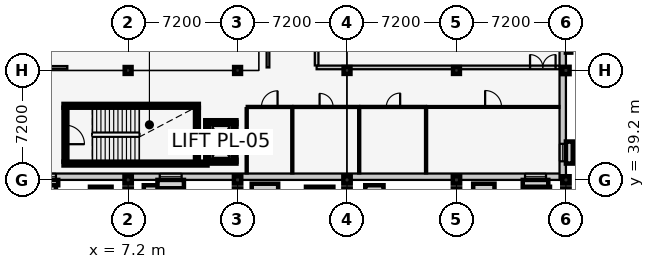
"""IFC4 building model, lengths in metres.
Left out: names, types, materials, properties, quantities, classifications, styles, units other than length and angle.
Written with IfcOpenShell. Run it as: python <this file> out.ifc"""

import sys

from ifc_helpers import new_model, si_unit, direction, frame, frame_2d, origin, origin_2d, place, context, subcontext, project, spatial, rectangle, extrude, element, fill, save


model = new_model("IFC4")
c1 = context("Model", 3, precision=1e-05, world=origin(), true_north=direction((0.0, 1.0)))
c2 = subcontext(c1, "Body", "Model", "MODEL_VIEW")
j1 = project(units=[si_unit("LENGTHUNIT", "METRE"), si_unit("PLANEANGLEUNIT", "RADIAN")], contexts=[c1])
p1 = place(None, origin())
s1 = spatial("IfcSite", under=j1, at=p1, CompositionType="ELEMENT")
p2 = place(p1, origin())
s2 = spatial("IfcBuilding", under=s1, at=p2, CompositionType="ELEMENT")
p3 = place(p2, frame((0.0, 0.0, 9.6)))
s3 = spatial("IfcBuildingStorey", under=s2, at=p3, CompositionType="ELEMENT", Elevation=9.6)
for number, where, z_axis, x_axis in (
    (1, (7.2, 38.4, 0.0), (0.0, 0.0, 1.0), (1.0, 0.0, 0.0)),
    (2, (14.4, 38.4, 0.0), (0.0, 0.0, 1.0), (1.0, 0.0, 0.0)),
    (3, (21.6, 38.4, 0.0), (0.0, 0.0, 1.0), (1.0, 0.0, 0.0)),
    (4, (28.8, 38.4, 0.0), (0.0, 0.0, 1.0), (1.0, 0.0, 0.0)),
    (5, (36.0, 38.4, 0.0), (0.0, 0.0, 1.0), (1.0, 0.0, 0.0)),
    (6, (7.2, 39.2, 0.0), (0.0, 0.0, 1.0), (1.0, 0.0, 0.0)),
):
    element("IfcColumn", number, at=place(p3, frame(where, z_axis=z_axis, x_axis=x_axis)), inside=s3, PredefinedType="COLUMN", context=c2, shape_type="SweptSolid", body=[
        extrude(rectangle(XDim=0.48, YDim=0.48, at=origin_2d()), origin(), (0.0, 0.0, 1.0), 4.2),
    ])
p4 = place(p3, frame((7.2, 46.4, 0.0), z_axis=(0.0, 0.0, 1.0), x_axis=(1.0, 0.0, 0.0)))
e7 = element("IfcColumn", 7, at=p4, inside=s3, PredefinedType="COLUMN", context=c2, shape_type="SweptSolid", body=[
    extrude(rectangle(XDim=0.45, YDim=0.45, at=origin_2d()), origin(), (0.0, 0.0, 1.0), 4.2),
])
p5 = place(p3, frame((14.4, 39.2, 0.0), z_axis=(0.0, 0.0, 1.0), x_axis=(1.0, 0.0, 0.0)))
e8 = element("IfcColumn", 8, at=p5, inside=s3, PredefinedType="COLUMN", context=c2, shape_type="SweptSolid", body=[
    extrude(rectangle(XDim=0.48, YDim=0.48, at=origin_2d()), origin(), (0.0, 0.0, 1.0), 4.2),
])
p6 = place(p3, frame((14.4, 46.4, 0.0), z_axis=(0.0, 0.0, 1.0), x_axis=(1.0, 0.0, 0.0)))
e9 = element("IfcColumn", 9, at=p6, inside=s3, PredefinedType="COLUMN", context=c2, shape_type="SweptSolid", body=[
    extrude(rectangle(XDim=0.45, YDim=0.45, at=origin_2d()), origin(), (0.0, 0.0, 1.0), 4.2),
])
p7 = place(p3, frame((21.6, 39.2, 0.0), z_axis=(0.0, 0.0, 1.0), x_axis=(1.0, 0.0, 0.0)))
e10 = element("IfcColumn", 10, at=p7, inside=s3, PredefinedType="COLUMN", context=c2, shape_type="SweptSolid", body=[
    extrude(rectangle(XDim=0.48, YDim=0.48, at=origin_2d()), origin(), (0.0, 0.0, 1.0), 4.2),
])
p8 = place(p3, frame((21.6, 46.4, 0.0), z_axis=(0.0, 0.0, 1.0), x_axis=(1.0, 0.0, 0.0)))
e11 = element("IfcColumn", 11, at=p8, inside=s3, PredefinedType="COLUMN", context=c2, shape_type="SweptSolid", body=[
    extrude(rectangle(XDim=0.45, YDim=0.45, at=origin_2d()), origin(), (0.0, 0.0, 1.0), 4.2),
])
p9 = place(p3, frame((28.8, 39.2, 0.0), z_axis=(0.0, 0.0, 1.0), x_axis=(1.0, 0.0, 0.0)))
e12 = element("IfcColumn", 12, at=p9, inside=s3, PredefinedType="COLUMN", context=c2, shape_type="SweptSolid", body=[
    extrude(rectangle(XDim=0.48, YDim=0.48, at=origin_2d()), origin(), (0.0, 0.0, 1.0), 4.2),
])
p10 = place(p3, frame((28.8, 46.4, 0.0), z_axis=(0.0, 0.0, 1.0), x_axis=(1.0, 0.0, 0.0)))
e13 = element("IfcColumn", 13, at=p10, inside=s3, PredefinedType="COLUMN", context=c2, shape_type="SweptSolid", body=[
    extrude(rectangle(XDim=0.45, YDim=0.45, at=origin_2d()), origin(), (0.0, 0.0, 1.0), 4.2),
])
for number, where, z_axis, x_axis in (
    (14, (36.0, 39.2, 0.0), (0.0, 0.0, 1.0), (1.0, 0.0, 0.0)),
    (15, (36.0, 46.4, 0.0), (0.0, 0.0, 1.0), (1.0, 0.0, 0.0)),
):
    element("IfcColumn", number, at=place(p3, frame(where, z_axis=z_axis, x_axis=x_axis)), inside=s3, PredefinedType="COLUMN", context=c2, shape_type="SweptSolid", body=[
        extrude(rectangle(XDim=0.48, YDim=0.48, at=origin_2d()), origin(), (0.0, 0.0, 1.0), 4.2),
    ])
p11 = place(p3, frame((36.0, 39.41, 0.0), z_axis=(0.0, 0.0, 1.0), x_axis=(-1.0, 0.0, 0.0)))
e16 = element("IfcWall", 16, at=p11, inside=s3, PredefinedType="SOLIDWALL", context=c2, shape_type="SweptSolid", body=[
    extrude(rectangle(XDim=36.0, YDim=0.42, at=frame_2d((18.0, 0.0))), origin(), (0.0, 0.0, 1.0), 3.245),
])
p12 = place(p11, frame((1.31, 0.0, 0.9)))
e17 = element("IfcOpeningElement", 17, at=p12, cuts=e16, PredefinedType="OPENING", context=c2, shape_type="SweptSolid", body=[
    extrude(rectangle(XDim=1.38, YDim=1.6, at=frame_2d((0.69, 0.8))), frame((0.0, 0.222, 0.0), z_axis=(0.0, -1.0, 0.0), x_axis=(1.0, 0.0, 0.0)), (0.0, 0.0, 1.0), 0.444),
])
p13 = place(p11, frame((25.28, 0.0, 0.9)))
e18 = element("IfcOpeningElement", 18, at=p13, cuts=e16, PredefinedType="OPENING", context=c2, shape_type="SweptSolid", body=[
    extrude(rectangle(XDim=1.44, YDim=1.75, at=frame_2d((0.72, 0.875))), frame((0.0, 0.222, 0.0), z_axis=(0.0, -1.0, 0.0), x_axis=(1.0, 0.0, 0.0)), (0.0, 0.0, 1.0), 0.444),
])
p14 = place(p11, frame((33.55, 0.0, 0.9)))
e19 = element("IfcOpeningElement", 19, at=p14, cuts=e16, PredefinedType="OPENING", context=c2, shape_type="SweptSolid", body=[
    extrude(rectangle(XDim=0.9, YDim=1.35, at=frame_2d((0.45, 0.675))), frame((0.0, 0.222, 0.0), z_axis=(0.0, -1.0, 0.0), x_axis=(1.0, 0.0, 0.0)), (0.0, 0.0, 1.0), 0.444),
])
p15 = place(p3, frame((35.79, 68.0, 0.0), z_axis=(0.0, 0.0, 1.0), x_axis=(0.0, -1.0, 0.0)))
e20 = element("IfcWall", 20, at=p15, inside=s3, PredefinedType="SOLIDWALL", context=c2, shape_type="SweptSolid", body=[
    extrude(rectangle(XDim=28.8, YDim=0.42, at=frame_2d((14.4, 0.0))), origin(), (0.0, 0.0, 1.0), 3.345),
])
p16 = place(p15, frame((1.3, 0.0, 0.9)))
e21 = element("IfcOpeningElement", 21, at=p16, cuts=e20, PredefinedType="OPENING", context=c2, shape_type="SweptSolid", body=[
    extrude(rectangle(XDim=1.0, YDim=1.35, at=frame_2d((0.5, 0.675))), frame((0.0, 0.222, 0.0), z_axis=(0.0, -1.0, 0.0), x_axis=(1.0, 0.0, 0.0)), (0.0, 0.0, 1.0), 0.444),
])
p17 = place(p15, frame((4.85, 0.0, 0.9)))
e22 = element("IfcOpeningElement", 22, at=p17, cuts=e20, PredefinedType="OPENING", context=c2, shape_type="SweptSolid", body=[
    extrude(rectangle(XDim=1.1, YDim=1.35, at=frame_2d((0.55, 0.675))), frame((0.0, 0.222, 0.0), z_axis=(0.0, -1.0, 0.0), x_axis=(1.0, 0.0, 0.0)), (0.0, 0.0, 1.0), 0.444),
])
p18 = place(p15, frame((8.4, 0.0, 0.9)))
e23 = element("IfcOpeningElement", 23, at=p18, cuts=e20, PredefinedType="OPENING", context=c2, shape_type="SweptSolid", body=[
    extrude(rectangle(XDim=1.2, YDim=1.35, at=frame_2d((0.6, 0.675))), frame((0.0, 0.222, 0.0), z_axis=(0.0, -1.0, 0.0), x_axis=(1.0, 0.0, 0.0)), (0.0, 0.0, 1.0), 0.444),
])
p19 = place(p15, frame((11.95, 0.0, 0.9)))
e24 = element("IfcOpeningElement", 24, at=p19, cuts=e20, PredefinedType="OPENING", context=c2, shape_type="SweptSolid", body=[
    extrude(rectangle(XDim=1.3, YDim=1.35, at=frame_2d((0.65, 0.675))), frame((0.0, 0.222, 0.0), z_axis=(0.0, -1.0, 0.0), x_axis=(1.0, 0.0, 0.0)), (0.0, 0.0, 1.0), 0.444),
])
p20 = place(p15, frame((15.5, 0.0, 0.9)))
e25 = element("IfcOpeningElement", 25, at=p20, cuts=e20, PredefinedType="OPENING", context=c2, shape_type="SweptSolid", body=[
    extrude(rectangle(XDim=1.4, YDim=1.35, at=frame_2d((0.7, 0.675))), frame((0.0, 0.222, 0.0), z_axis=(0.0, -1.0, 0.0), x_axis=(1.0, 0.0, 0.0)), (0.0, 0.0, 1.0), 0.444),
])
p21 = place(p15, frame((19.325, 0.0, 0.9)))
e26 = element("IfcOpeningElement", 26, at=p21, cuts=e20, PredefinedType="OPENING", context=c2, shape_type="SweptSolid", body=[
    extrude(rectangle(XDim=0.95, YDim=1.45, at=frame_2d((0.475, 0.725))), frame((0.0, 0.222, 0.0), z_axis=(0.0, -1.0, 0.0), x_axis=(1.0, 0.0, 0.0)), (0.0, 0.0, 1.0), 0.444),
])
p22 = place(p15, frame((26.425, 0.0, 0.9)))
e27 = element("IfcOpeningElement", 27, at=p22, cuts=e20, PredefinedType="OPENING", context=c2, shape_type="SweptSolid", body=[
    extrude(rectangle(XDim=1.15, YDim=1.45, at=frame_2d((0.575, 0.725))), frame((0.0, 0.222, 0.0), z_axis=(0.0, -1.0, 0.0), x_axis=(1.0, 0.0, 0.0)), (0.0, 0.0, 1.0), 0.444),
])
p23 = place(p3, frame((2.95, 40.275, 0.0), z_axis=(0.0, 0.0, 1.0), x_axis=(1.0, 0.0, 0.0)))
e28 = element("IfcWall", 28, at=p23, inside=s3, PredefinedType="SHEAR", context=c2, shape_type="SweptSolid", body=[
    extrude(rectangle(XDim=9.47, YDim=0.25, at=frame_2d((4.735, 0.0))), origin(), (0.0, 0.0, 1.0), 3.95),
])
p24 = place(p3, frame((11.85, 44.075, 0.0), z_axis=(0.0, 0.0, 1.0), x_axis=(-1.0, 0.0, 0.0)))
e29 = element("IfcWall", 29, at=p24, inside=s3, PredefinedType="SHEAR", context=c2, shape_type="SweptSolid", body=[
    extrude(rectangle(XDim=8.9, YDim=0.25, at=frame_2d((4.45, 0.0))), origin(), (0.0, 0.0, 1.0), 3.95),
])
p25 = place(p3, frame((3.075, 43.95, 0.0), z_axis=(0.0, 0.0, 1.0), x_axis=(0.0, -1.0, 0.0)))
e30 = element("IfcWall", 30, at=p25, inside=s3, PredefinedType="SHEAR", context=c2, shape_type="SweptSolid", body=[
    extrude(rectangle(XDim=3.55, YDim=0.25, at=frame_2d((1.775, 0.0))), origin(), (0.0, 0.0, 1.0), 3.95),
])
p26 = place(p25, frame((1.15, 0.0, 0.0)))
e31 = element("IfcOpeningElement", 31, at=p26, cuts=e30, PredefinedType="OPENING", context=c2, shape_type="SweptSolid", body=[
    extrude(rectangle(XDim=1.25, YDim=2.15, at=frame_2d((0.625, 1.075))), frame((0.0, 0.137, 0.0), z_axis=(0.0, -1.0, 0.0), x_axis=(1.0, 0.0, 0.0)), (0.0, 0.0, 1.0), 0.274),
])
p27 = place(p3, frame((11.725, 40.4, 0.0), z_axis=(0.0, 0.0, 1.0), x_axis=(0.0, 1.0, 0.0)))
e32 = element("IfcWall", 32, at=p27, inside=s3, PredefinedType="SHEAR", context=c2, shape_type="SweptSolid", body=[
    extrude(rectangle(XDim=3.55, YDim=0.25, at=frame_2d((1.775, 0.0))), origin(), (0.0, 0.0, 1.0), 3.95),
])
p28 = place(p3, frame((12.275, 40.4, 0.0), z_axis=(0.0, 0.0, 1.0), x_axis=(1.0, 0.0, 0.0)))
e33 = element("IfcWall", 33, at=p28, inside=s3, PredefinedType="SHEAR", context=c2, shape_type="SweptSolid", body=[
    extrude(rectangle(XDim=2.05, YDim=0.25, at=frame_2d((1.025, 0.0))), origin(), (0.0, 0.0, 1.0), 3.95),
])
p29 = place(p3, frame((14.325, 43.0, 0.0), z_axis=(0.0, 0.0, 1.0), x_axis=(-1.0, 0.0, 0.0)))
e34 = element("IfcWall", 34, at=p29, inside=s3, PredefinedType="SHEAR", context=c2, shape_type="SweptSolid", body=[
    extrude(rectangle(XDim=2.05, YDim=0.25, at=frame_2d((1.025, 0.0))), origin(), (0.0, 0.0, 1.0), 3.95),
])
p30 = place(p29, frame((0.55, 0.0, 0.0)))
e35 = element("IfcOpeningElement", 35, at=p30, cuts=e34, PredefinedType="OPENING", context=c2, shape_type="SweptSolid", body=[
    extrude(rectangle(XDim=0.95, YDim=2.1, at=frame_2d((0.475, 1.05))), frame((0.0, 0.137, 0.0), z_axis=(0.0, -1.0, 0.0), x_axis=(1.0, 0.0, 0.0)), (0.0, 0.0, 1.0), 0.274),
])
for number, where, z_axis, x_axis in (
    (36, (12.4, 43.0, 0.0), (0.0, 0.0, 1.0), (0.0, -1.0, 0.0)),
    (37, (14.2, 40.4, 0.0), (0.0, 0.0, 1.0), (0.0, 1.0, 0.0)),
):
    element("IfcWall", number, at=place(p3, frame(where, z_axis=z_axis, x_axis=x_axis)), inside=s3, PredefinedType="SHEAR", context=c2, shape_type="SweptSolid", body=[
        extrude(rectangle(XDim=2.6, YDim=0.25, at=frame_2d((1.3, 0.0))), origin(), (0.0, 0.0, 1.0), 3.95),
    ])
p31 = place(p3, frame((0.43, 46.6, 0.0), z_axis=(0.0, 0.0, 1.0), x_axis=(1.0, 0.0, 0.0)))
e38 = element("IfcWall", 38, at=p31, inside=s3, PredefinedType="PARTITIONING", context=c2, shape_type="SweptSolid", body=[
    extrude(rectangle(XDim=2.77, YDim=0.18, at=frame_2d((1.385, 0.0))), origin(), (0.0, 0.0, 1.0), 3.225),
])
p32 = place(p3, frame((16.4, 46.6, 0.0), z_axis=(0.0, 0.0, 1.0), x_axis=(0.0, 1.0, 0.0)))
e39 = element("IfcWall", 39, at=p32, inside=s3, PredefinedType="PARTITIONING", context=c2, shape_type="SweptSolid", body=[
    extrude(rectangle(XDim=20.97, YDim=0.18, at=frame_2d((10.485, 0.0))), origin(), (0.0, 0.0, 1.0), 3.95),
])
p33 = place(p32, frame((6.42, 0.0, 0.0)))
e40 = element("IfcOpeningElement", 40, at=p33, cuts=e39, PredefinedType="OPENING", context=c2, shape_type="SweptSolid", body=[
    extrude(rectangle(XDim=1.76, YDim=2.3, at=frame_2d((0.88, 1.15))), frame((0.0, 0.102, 0.0), z_axis=(0.0, -1.0, 0.0), x_axis=(1.0, 0.0, 0.0)), (0.0, 0.0, 1.0), 0.204),
])
p34 = place(p32, frame((17.325, 0.0, 0.0)))
e41 = element("IfcOpeningElement", 41, at=p34, cuts=e39, PredefinedType="OPENING", context=c2, shape_type="SweptSolid", body=[
    extrude(rectangle(XDim=0.92, YDim=2.08, at=frame_2d((0.46, 1.04))), frame((0.0, 0.102, 0.0), z_axis=(0.0, -1.0, 0.0), x_axis=(1.0, 0.0, 0.0)), (0.0, 0.0, 1.0), 0.204),
])
p35 = place(p3, frame((19.6, 46.6, 0.0), z_axis=(0.0, 0.0, 1.0), x_axis=(1.0, 0.0, 0.0)))
e42 = element("IfcWall", 42, at=p35, inside=s3, PredefinedType="PARTITIONING", context=c2, shape_type="SweptSolid", body=[
    extrude(rectangle(XDim=15.97, YDim=0.24, at=frame_2d((7.985, 0.0))), origin(), (0.0, 0.0, 1.0), 3.125),
])
p36 = place(p35, frame((14.04, 0.0, 0.0)))
e43 = element("IfcOpeningElement", 43, at=p36, cuts=e42, PredefinedType="OPENING", context=c2, shape_type="SweptSolid", body=[
    extrude(rectangle(XDim=1.68, YDim=2.3, at=frame_2d((0.84, 1.15))), frame((0.0, 0.132, 0.0), z_axis=(0.0, -1.0, 0.0), x_axis=(1.0, 0.0, 0.0)), (0.0, 0.0, 1.0), 0.264),
])
p37 = place(p3, frame((19.6, 46.73, 0.0), z_axis=(0.0, 0.0, 1.0), x_axis=(0.0, 1.0, 0.0)))
e44 = element("IfcWall", 44, at=p37, inside=s3, PredefinedType="PARTITIONING", context=c2, shape_type="SweptSolid", body=[
    extrude(rectangle(XDim=14.34, YDim=0.24, at=frame_2d((7.17, 0.0))), origin(), (0.0, 0.0, 1.0), 3.95),
])
p38 = place(p3, frame((15.0, 44.0, 0.0), z_axis=(0.0, 0.0, 1.0), x_axis=(1.0, 0.0, 0.0)))
e45 = element("IfcWall", 45, at=p38, inside=s3, PredefinedType="PARTITIONING", context=c2, shape_type="SweptSolid", body=[
    extrude(rectangle(XDim=3.0, YDim=0.14, at=frame_2d((1.5, 0.0))), origin(), (0.0, 0.0, 1.0), 3.95),
])
p39 = place(p38, frame((0.97, 0.0, 0.0)))
e46 = element("IfcOpeningElement", 46, at=p39, cuts=e45, PredefinedType="OPENING", context=c2, shape_type="SweptSolid", body=[
    extrude(rectangle(XDim=1.06, YDim=2.1, at=frame_2d((0.53, 1.05))), frame((0.0, 0.082, 0.0), z_axis=(0.0, -1.0, 0.0), x_axis=(1.0, 0.0, 0.0)), (0.0, 0.0, 1.0), 0.164),
])
p40 = place(p3, frame((15.0, 39.63, 0.0), z_axis=(0.0, 0.0, 1.0), x_axis=(0.0, 1.0, 0.0)))
e47 = element("IfcWall", 47, at=p40, inside=s3, PredefinedType="PARTITIONING", context=c2, shape_type="SweptSolid", body=[
    extrude(rectangle(XDim=4.29, YDim=0.14, at=frame_2d((2.145, 0.0))), origin(), (0.0, 0.0, 1.0), 3.95),
])
p41 = place(p3, frame((18.0, 39.63, 0.0), z_axis=(0.0, 0.0, 1.0), x_axis=(0.0, 1.0, 0.0)))
e48 = element("IfcWall", 48, at=p41, inside=s3, PredefinedType="PARTITIONING", context=c2, shape_type="SweptSolid", body=[
    extrude(rectangle(XDim=4.29, YDim=0.14, at=frame_2d((2.145, 0.0))), origin(), (0.0, 0.0, 1.0), 3.535),
])
p42 = place(p3, frame((18.08, 44.0, 0.0), z_axis=(0.0, 0.0, 1.0), x_axis=(1.0, 0.0, 0.0)))
e49 = element("IfcWall", 49, at=p42, inside=s3, PredefinedType="PARTITIONING", context=c2, shape_type="SweptSolid", body=[
    extrude(rectangle(XDim=4.32, YDim=0.14, at=frame_2d((2.16, 0.0))), origin(), (0.0, 0.0, 1.0), 3.95),
])
p43 = place(p42, frame((1.715, 0.0, 0.0)))
e50 = element("IfcOpeningElement", 50, at=p43, cuts=e49, PredefinedType="OPENING", context=c2, shape_type="SweptSolid", body=[
    extrude(rectangle(XDim=0.89, YDim=2.05, at=frame_2d((0.445, 1.025))), frame((0.0, 0.082, 0.0), z_axis=(0.0, -1.0, 0.0), x_axis=(1.0, 0.0, 0.0)), (0.0, 0.0, 1.0), 0.164),
])
p44 = place(p3, frame((22.4, 39.63, 0.0), z_axis=(0.0, 0.0, 1.0), x_axis=(0.0, 1.0, 0.0)))
e51 = element("IfcWall", 51, at=p44, inside=s3, PredefinedType="PARTITIONING", context=c2, shape_type="SweptSolid", body=[
    extrude(rectangle(XDim=4.29, YDim=0.14, at=frame_2d((2.145, 0.0))), origin(), (0.0, 0.0, 1.0), 3.95),
])
p45 = place(p3, frame((22.48, 44.0, 0.0), z_axis=(0.0, 0.0, 1.0), x_axis=(1.0, 0.0, 0.0)))
e52 = element("IfcWall", 52, at=p45, inside=s3, PredefinedType="PARTITIONING", context=c2, shape_type="SweptSolid", body=[
    extrude(rectangle(XDim=4.32, YDim=0.14, at=frame_2d((2.16, 0.0))), origin(), (0.0, 0.0, 1.0), 3.95),
])
p46 = place(p45, frame((1.705, 0.0, 0.0)))
e53 = element("IfcOpeningElement", 53, at=p46, cuts=e52, PredefinedType="OPENING", context=c2, shape_type="SweptSolid", body=[
    extrude(rectangle(XDim=0.91, YDim=2.06, at=frame_2d((0.455, 1.03))), frame((0.0, 0.082, 0.0), z_axis=(0.0, -1.0, 0.0), x_axis=(1.0, 0.0, 0.0)), (0.0, 0.0, 1.0), 0.164),
])
p47 = place(p3, frame((26.8, 39.63, 0.0), z_axis=(0.0, 0.0, 1.0), x_axis=(0.0, 1.0, 0.0)))
e54 = element("IfcWall", 54, at=p47, inside=s3, PredefinedType="PARTITIONING", context=c2, shape_type="SweptSolid", body=[
    extrude(rectangle(XDim=4.29, YDim=0.14, at=frame_2d((2.145, 0.0))), origin(), (0.0, 0.0, 1.0), 3.95),
])
p48 = place(p3, frame((26.88, 44.0, 0.0), z_axis=(0.0, 0.0, 1.0), x_axis=(1.0, 0.0, 0.0)))
e55 = element("IfcWall", 55, at=p48, inside=s3, PredefinedType="PARTITIONING", context=c2, shape_type="SweptSolid", body=[
    extrude(rectangle(XDim=8.69, YDim=0.125, at=frame_2d((4.345, 0.0))), origin(), (0.0, 0.0, 1.0), 3.96),
])
p49 = place(p48, frame((3.805, 0.0, 0.0)))
e56 = element("IfcOpeningElement", 56, at=p49, cuts=e55, PredefinedType="OPENING", context=c2, shape_type="SweptSolid", body=[
    extrude(rectangle(XDim=1.08, YDim=2.15, at=frame_2d((0.54, 1.075))), frame((0.0, 0.074, 0.0), z_axis=(0.0, -1.0, 0.0), x_axis=(1.0, 0.0, 0.0)), (0.0, 0.0, 1.0), 0.149),
])
p50 = place(p12, origin())
e57 = element("IfcWindow", 57, at=p50, inside=s3, PartitioningType="SINGLE_PANEL", PredefinedType="WINDOW", context=c2, shape_type="SweptSolid", body=[
    extrude(rectangle(XDim=1.38, YDim=1.6, at=frame_2d((0.69, 0.8))), frame((0.0, 0.03, 0.0), z_axis=(0.0, -1.0, 0.0), x_axis=(1.0, 0.0, 0.0)), (0.0, 0.0, 1.0), 0.06),
])
fill(e17, e57)
p51 = place(p13, origin())
e58 = element("IfcWindow", 58, at=p51, inside=s3, PartitioningType="SINGLE_PANEL", PredefinedType="WINDOW", context=c2, shape_type="SweptSolid", body=[
    extrude(rectangle(XDim=1.44, YDim=1.75, at=frame_2d((0.72, 0.875))), frame((0.0, 0.03, 0.0), z_axis=(0.0, -1.0, 0.0), x_axis=(1.0, 0.0, 0.0)), (0.0, 0.0, 1.0), 0.06),
])
fill(e18, e58)
p52 = place(p14, origin())
e59 = element("IfcWindow", 59, at=p52, inside=s3, PartitioningType="SINGLE_PANEL", PredefinedType="WINDOW", context=c2, shape_type="SweptSolid", body=[
    extrude(rectangle(XDim=0.9, YDim=1.35, at=frame_2d((0.45, 0.675))), frame((0.0, 0.03, 0.0), z_axis=(0.0, -1.0, 0.0), x_axis=(1.0, 0.0, 0.0)), (0.0, 0.0, 1.0), 0.06),
])
fill(e19, e59)
p53 = place(p22, origin())
e60 = element("IfcWindow", 60, at=p53, inside=s3, PartitioningType="SINGLE_PANEL", PredefinedType="WINDOW", context=c2, shape_type="SweptSolid", body=[
    extrude(rectangle(XDim=1.15, YDim=1.45, at=frame_2d((0.575, 0.725))), frame((0.0, 0.03, 0.0), z_axis=(0.0, -1.0, 0.0), x_axis=(1.0, 0.0, 0.0)), (0.0, 0.0, 1.0), 0.06),
])
fill(e27, e60)
p54 = place(p26, origin())
e61 = element("IfcDoor", 61, at=p54, inside=s3, OperationType="SINGLE_SWING_RIGHT", PredefinedType="DOOR", context=c2, shape_type="SweptSolid", body=[
    extrude(rectangle(XDim=1.25, YDim=2.15, at=frame_2d((0.625, 1.075))), frame((0.0, 0.025, 0.0), z_axis=(0.0, -1.0, 0.0), x_axis=(1.0, 0.0, 0.0)), (0.0, 0.0, 1.0), 0.05),
])
fill(e31, e61)
p55 = place(p30, origin())
e62 = element("IfcDoor", 62, at=p55, inside=s3, OperationType="SLIDING_TO_LEFT", PredefinedType="DOOR", context=c2, shape_type="SweptSolid", body=[
    extrude(rectangle(XDim=0.95, YDim=2.1, at=frame_2d((0.475, 1.05))), frame((0.0, 0.025, 0.0), z_axis=(0.0, -1.0, 0.0), x_axis=(1.0, 0.0, 0.0)), (0.0, 0.0, 1.0), 0.05),
])
fill(e35, e62)
p56 = place(p36, origin())
e63 = element("IfcDoor", 63, at=p56, inside=s3, OperationType="DOUBLE_DOOR_SINGLE_SWING", PredefinedType="DOOR", context=c2, shape_type="SweptSolid", body=[
    extrude(rectangle(XDim=1.68, YDim=2.3, at=frame_2d((0.84, 1.15))), frame((0.0, 0.025, 0.0), z_axis=(0.0, -1.0, 0.0), x_axis=(1.0, 0.0, 0.0)), (0.0, 0.0, 1.0), 0.05),
])
fill(e43, e63)
p57 = place(p39, origin())
e64 = element("IfcDoor", 64, at=p57, inside=s3, OperationType="SINGLE_SWING_RIGHT", PredefinedType="DOOR", context=c2, shape_type="SweptSolid", body=[
    extrude(rectangle(XDim=1.06, YDim=2.1, at=frame_2d((0.53, 1.05))), frame((0.0, 0.025, 0.0), z_axis=(0.0, -1.0, 0.0), x_axis=(1.0, 0.0, 0.0)), (0.0, 0.0, 1.0), 0.05),
])
fill(e46, e64)
p58 = place(p43, origin())
e65 = element("IfcDoor", 65, at=p58, inside=s3, OperationType="SINGLE_SWING_LEFT", PredefinedType="DOOR", context=c2, shape_type="SweptSolid", body=[
    extrude(rectangle(XDim=0.89, YDim=2.05, at=frame_2d((0.445, 1.025))), frame((0.0, 0.025, 0.0), z_axis=(0.0, -1.0, 0.0), x_axis=(1.0, 0.0, 0.0)), (0.0, 0.0, 1.0), 0.05),
])
fill(e50, e65)
p59 = place(p46, origin())
e66 = element("IfcDoor", 66, at=p59, inside=s3, OperationType="SINGLE_SWING_RIGHT", PredefinedType="DOOR", context=c2, shape_type="SweptSolid", body=[
    extrude(rectangle(XDim=0.91, YDim=2.06, at=frame_2d((0.455, 1.03))), frame((0.0, 0.025, 0.0), z_axis=(0.0, -1.0, 0.0), x_axis=(1.0, 0.0, 0.0)), (0.0, 0.0, 1.0), 0.05),
])
fill(e53, e66)
p60 = place(p49, origin())
e67 = element("IfcDoor", 67, at=p60, inside=s3, OperationType="SINGLE_SWING_LEFT", PredefinedType="DOOR", context=c2, shape_type="SweptSolid", body=[
    extrude(rectangle(XDim=1.08, YDim=2.15, at=frame_2d((0.54, 1.075))), frame((0.0, 0.025, 0.0), z_axis=(0.0, -1.0, 0.0), x_axis=(1.0, 0.0, 0.0)), (0.0, 0.0, 1.0), 0.05),
])
fill(e56, e67)
save(model, sys.argv[1])
